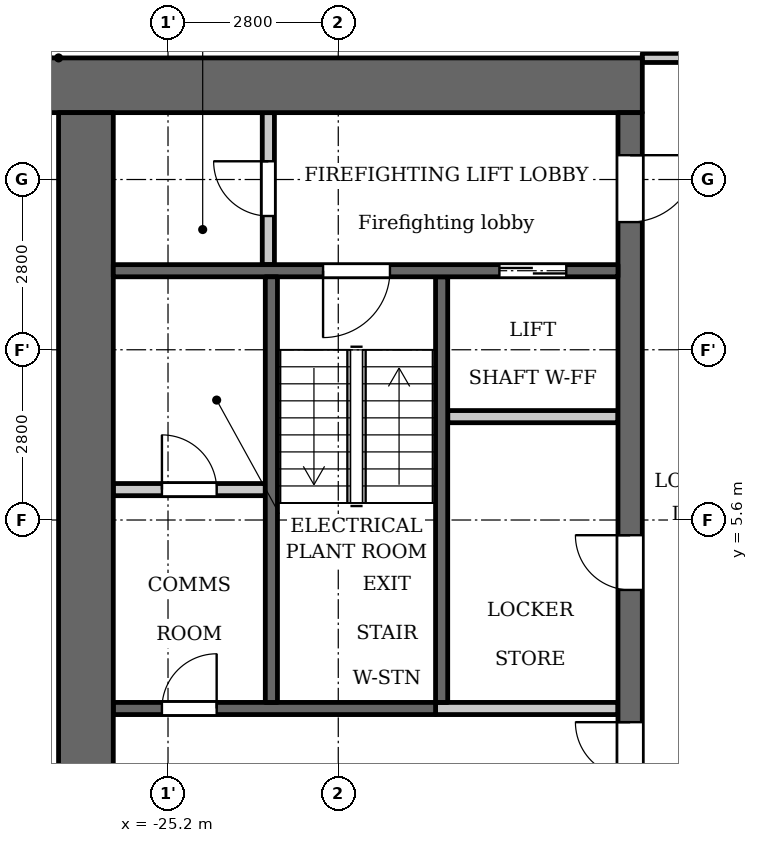
"""IFC4 building model, lengths in metres.
Left out: names, types, materials, properties, quantities, classifications, styles, units other than length and angle.
Written with IfcOpenShell. Run it as: python <this file> out.ifc"""

import sys

from ifc_helpers import new_model, si_unit, direction, frame, frame_2d, origin, place, context, subcontext, project, spatial, rectangle, extrude, element, fill, save


model = new_model("IFC4")
c1 = context("Model", 3, precision=1e-05, world=origin(), true_north=direction((0.0, 1.0)))
c2 = subcontext(c1, "Body", "Model", "MODEL_VIEW")
j1 = project(units=[si_unit("LENGTHUNIT", "METRE"), si_unit("PLANEANGLEUNIT", "RADIAN")], contexts=[c1])
p1 = place(None, origin())
s1 = spatial("IfcSite", under=j1, at=p1, CompositionType="ELEMENT")
p2 = place(p1, origin())
s2 = spatial("IfcBuilding", under=s1, at=p2, CompositionType="ELEMENT")
p3 = place(p2, frame((0.0, 0.0, 51.5)))
s3 = spatial("IfcBuildingStorey", under=s2, at=p3, CompositionType="ELEMENT", Elevation=51.5)
p4 = place(p3, frame((-20.7, 2.6, 0.0), z_axis=(0.0, 0.0, 1.0), x_axis=(0.0, 1.0, 0.0)))
e1 = element("IfcWall", 1, at=p4, inside=s3, PredefinedType="SHEAR", context=c2, shape_type="SweptSolid", body=[
    extrude(rectangle(XDim=7.0, YDim=0.2, at=frame_2d((3.5, 0.0))), origin(), (0.0, 0.0, 1.0), 3.2),
])
p5 = place(p3, frame((-20.8, 2.5, 0.0), z_axis=(0.0, 0.0, 1.0), x_axis=(-1.0, 0.0, 0.0)))
e2 = element("IfcWall", 2, at=p5, inside=s3, PredefinedType="SHEAR", context=c2, shape_type="SweptSolid", body=[
    extrude(rectangle(XDim=5.3, YDim=0.2, at=frame_2d((2.65, 0.0))), origin(), (0.0, 0.0, 1.0), 3.2),
])
p6 = place(p5, frame((3.6, 0.0, 0.0)))
e3 = element("IfcOpeningElement", 3, at=p6, cuts=e2, PredefinedType="OPENING", context=c2, shape_type="SweptSolid", body=[
    extrude(rectangle(XDim=0.9, YDim=2.1, at=frame_2d((0.45, 1.05))), frame((0.0, 0.11, 0.0), z_axis=(0.0, -1.0, 0.0), x_axis=(1.0, 0.0, 0.0)), (0.0, 0.0, 1.0), 0.22),
])
p7 = place(p3, frame((-17.4, 12.75, 0.0), z_axis=(0.0, 0.0, 1.0), x_axis=(-1.0, 0.0, 0.0)))
e4 = element("IfcWall", 4, at=p7, inside=s3, PredefinedType="SHEAR", context=c2, shape_type="SweptSolid", body=[
    extrude(rectangle(XDim=10.4, YDim=0.9, at=frame_2d((5.2, 0.0))), origin(), (0.0, 0.0, 1.0), 3.2),
])
p8 = place(p3, frame((-17.6, -12.3, 0.0), z_axis=(0.0, 0.0, 1.0), x_axis=(0.0, 1.0, 0.0)))
e5 = element("IfcWall", 5, at=p8, inside=s3, PredefinedType="SHEAR", context=c2, shape_type="SweptSolid", body=[
    extrude(rectangle(XDim=24.6, YDim=0.4, at=frame_2d((12.3, 0.0))), origin(), (0.0, 0.0, 1.0), 3.2),
])
p9 = place(p8, frame((6.0, 0.0, 0.0)))
e6 = element("IfcOpeningElement", 6, at=p9, cuts=e5, PredefinedType="OPENING", context=c2, shape_type="SweptSolid", body=[
    extrude(rectangle(XDim=1.1, YDim=2.1, at=frame_2d((0.55, 1.05))), frame((0.0, 0.21, 0.0), z_axis=(0.0, -1.0, 0.0), x_axis=(1.0, 0.0, 0.0)), (0.0, 0.0, 1.0), 0.42),
])
p10 = place(p8, frame((8.4, 0.0, 0.0)))
e7 = element("IfcOpeningElement", 7, at=p10, cuts=e5, PredefinedType="OPENING", context=c2, shape_type="SweptSolid", body=[
    extrude(rectangle(XDim=1.1, YDim=2.1, at=frame_2d((0.55, 1.05))), frame((0.0, 0.21, 0.0), z_axis=(0.0, -1.0, 0.0), x_axis=(1.0, 0.0, 0.0)), (0.0, 0.0, 1.0), 0.42),
])
p11 = place(p8, frame((10.8, 0.0, 0.0)))
e8 = element("IfcOpeningElement", 8, at=p11, cuts=e5, PredefinedType="OPENING", context=c2, shape_type="SweptSolid", body=[
    extrude(rectangle(XDim=1.1, YDim=2.1, at=frame_2d((0.55, 1.05))), frame((0.0, 0.21, 0.0), z_axis=(0.0, -1.0, 0.0), x_axis=(1.0, 0.0, 0.0)), (0.0, 0.0, 1.0), 0.42),
])
p12 = place(p8, frame((16.75, 0.0, 0.0)))
e9 = element("IfcOpeningElement", 9, at=p12, cuts=e5, PredefinedType="OPENING", context=c2, shape_type="SweptSolid", body=[
    extrude(rectangle(XDim=0.9, YDim=2.1, at=frame_2d((0.45, 1.05))), frame((0.0, 0.21, 0.0), z_axis=(0.0, -1.0, 0.0), x_axis=(1.0, 0.0, 0.0)), (0.0, 0.0, 1.0), 0.42),
])
p13 = place(p8, frame((22.8, 0.0, 0.0)))
e10 = element("IfcOpeningElement", 10, at=p13, cuts=e5, PredefinedType="OPENING", context=c2, shape_type="SweptSolid", body=[
    extrude(rectangle(XDim=1.1, YDim=2.1, at=frame_2d((0.55, 1.05))), frame((0.0, 0.21, 0.0), z_axis=(0.0, -1.0, 0.0), x_axis=(1.0, 0.0, 0.0)), (0.0, 0.0, 1.0), 0.42),
])
p14 = place(p8, frame((0.7, 0.0, 0.0)))
e11 = element("IfcOpeningElement", 11, at=p14, cuts=e5, PredefinedType="OPENING", context=c2, shape_type="SweptSolid", body=[
    extrude(rectangle(XDim=1.1, YDim=2.1, at=frame_2d((0.55, 1.05))), frame((0.0, 0.21, 0.0), z_axis=(0.0, -1.0, 0.0), x_axis=(1.0, 0.0, 0.0)), (0.0, 0.0, 1.0), 0.42),
])
p15 = place(p8, frame((12.775, 0.0, 0.0)))
e12 = element("IfcOpeningElement", 12, at=p15, cuts=e5, PredefinedType="OPENING", context=c2, shape_type="SweptSolid", body=[
    extrude(rectangle(XDim=1.8, YDim=2.1, at=frame_2d((0.9, 1.05))), frame((0.0, 0.21, 0.0), z_axis=(0.0, -1.0, 0.0), x_axis=(1.0, 0.0, 0.0)), (0.0, 0.0, 1.0), 0.42),
])
p16 = place(p3, frame((-26.55, -12.3, 0.0), z_axis=(0.0, 0.0, 1.0), x_axis=(0.0, 1.0, 0.0)))
e13 = element("IfcWall", 13, at=p16, inside=s3, PredefinedType="SHEAR", context=c2, shape_type="SweptSolid", body=[
    extrude(rectangle(XDim=24.6, YDim=0.9, at=frame_2d((12.3, 0.0))), origin(), (0.0, 0.0, 1.0), 3.2),
])
p17 = place(p3, frame((-23.55, 9.8, 0.0), z_axis=(0.0, 0.0, 1.0), x_axis=(0.0, 1.0, 0.0)))
e14 = element("IfcWall", 14, at=p17, inside=s3, PredefinedType="PARTITIONING", context=c2, shape_type="SweptSolid", body=[
    extrude(rectangle(XDim=2.5, YDim=0.2, at=frame_2d((1.25, 0.0))), origin(), (0.0, 0.0, 1.0), 3.2),
])
p18 = place(p17, frame((0.8, 0.0, 0.0)))
e15 = element("IfcOpeningElement", 15, at=p18, cuts=e14, PredefinedType="OPENING", context=c2, shape_type="SweptSolid", body=[
    extrude(rectangle(XDim=0.9, YDim=2.1, at=frame_2d((0.45, 1.05))), frame((0.0, 0.11, 0.0), z_axis=(0.0, -1.0, 0.0), x_axis=(1.0, 0.0, 0.0)), (0.0, 0.0, 1.0), 0.22),
])
p19 = place(p3, frame((-23.6, 6.1, 0.0), z_axis=(0.0, 0.0, 1.0), x_axis=(-1.0, 0.0, 0.0)))
e16 = element("IfcWall", 16, at=p19, inside=s3, PredefinedType="PARTITIONING", context=c2, shape_type="SweptSolid", body=[
    extrude(rectangle(XDim=2.5, YDim=0.2, at=frame_2d((1.25, 0.0))), origin(), (0.0, 0.0, 1.0), 3.2),
])
p20 = place(p19, frame((0.8, 0.0, 0.0)))
e17 = element("IfcOpeningElement", 17, at=p20, cuts=e16, PredefinedType="OPENING", context=c2, shape_type="SweptSolid", body=[
    extrude(rectangle(XDim=0.9, YDim=2.1, at=frame_2d((0.45, 1.05))), frame((0.0, 0.11, 0.0), z_axis=(0.0, -1.0, 0.0), x_axis=(1.0, 0.0, 0.0)), (0.0, 0.0, 1.0), 0.22),
])
p21 = place(p3, frame((-17.8, 2.5, 0.0), z_axis=(0.0, 0.0, 1.0), x_axis=(-1.0, 0.0, 0.0)))
e18 = element("IfcWall", 18, at=p21, inside=s3, PredefinedType="PARTITIONING", context=c2, shape_type="SweptSolid", body=[
    extrude(rectangle(XDim=3.0, YDim=0.2, at=frame_2d((1.5, 0.0))), origin(), (0.0, 0.0, 1.0), 3.2),
])
p22 = place(p3, frame((-17.8, 7.3, 0.0), z_axis=(0.0, 0.0, 1.0), x_axis=(-1.0, 0.0, 0.0)))
e19 = element("IfcWall", 19, at=p22, inside=s3, PredefinedType="PARTITIONING", context=c2, shape_type="SweptSolid", body=[
    extrude(rectangle(XDim=2.8, YDim=0.2, at=frame_2d((1.4, 0.0))), origin(), (0.0, 0.0, 1.0), 3.2),
])
p23 = place(p3, frame((-17.8, 9.7, 0.0), z_axis=(0.0, 0.0, 1.0), x_axis=(-1.0, 0.0, 0.0)))
e20 = element("IfcWall", 20, at=p23, inside=s3, PredefinedType="SHEAR", context=c2, shape_type="SweptSolid", body=[
    extrude(rectangle(XDim=8.3, YDim=0.2, at=frame_2d((4.15, 0.0))), origin(), (0.0, 0.0, 1.0), 3.2),
])
p24 = place(p23, frame((0.85, 0.0, 0.0)))
e21 = element("IfcOpeningElement", 21, at=p24, cuts=e20, PredefinedType="OPENING", context=c2, shape_type="SweptSolid", body=[
    extrude(rectangle(XDim=1.1, YDim=2.1, at=frame_2d((0.55, 1.05))), frame((0.0, 0.11, 0.0), z_axis=(0.0, -1.0, 0.0), x_axis=(1.0, 0.0, 0.0)), (0.0, 0.0, 1.0), 0.22),
])
p25 = place(p23, frame((3.75, 0.0, 0.0)))
e22 = element("IfcOpeningElement", 22, at=p25, cuts=e20, PredefinedType="OPENING", context=c2, shape_type="SweptSolid", body=[
    extrude(rectangle(XDim=1.1, YDim=2.1, at=frame_2d((0.55, 1.05))), frame((0.0, 0.11, 0.0), z_axis=(0.0, -1.0, 0.0), x_axis=(1.0, 0.0, 0.0)), (0.0, 0.0, 1.0), 0.22),
])
p26 = place(p3, frame((-23.5, 2.6, 0.0), z_axis=(0.0, 0.0, 1.0), x_axis=(0.0, 1.0, 0.0)))
e23 = element("IfcWall", 23, at=p26, inside=s3, PredefinedType="SHEAR", context=c2, shape_type="SweptSolid", body=[
    extrude(rectangle(XDim=7.0, YDim=0.2, at=frame_2d((3.5, 0.0))), origin(), (0.0, 0.0, 1.0), 3.2),
])
p27 = place(p3, frame((-17.4, 13.2, 0.0), z_axis=(0.0, 0.0, 1.0), x_axis=(1.0, 0.0, 0.0)))
e24 = element("IfcWall", 24, at=p27, inside=s3, PredefinedType="PARTITIONING", context=c2, shape_type="SweptSolid", body=[
    extrude(rectangle(XDim=34.8, YDim=0.15, at=frame_2d((17.4, 0.0))), origin(), (0.0, 0.0, 1.0), 3.2),
])
p28 = place(p27, frame((0.75, 0.0, 0.0)))
e25 = element("IfcOpeningElement", 25, at=p28, cuts=e24, PredefinedType="OPENING", context=c2, shape_type="SweptSolid", body=[
    extrude(rectangle(XDim=1.0, YDim=2.1, at=frame_2d((0.5, 1.05))), frame((0.0, 0.085, 0.0), z_axis=(0.0, -1.0, 0.0), x_axis=(1.0, 0.0, 0.0)), (0.0, 0.0, 1.0), 0.17),
])
p29 = place(p27, frame((33.15, 0.0, 0.0)))
e26 = element("IfcOpeningElement", 26, at=p29, cuts=e24, PredefinedType="OPENING", context=c2, shape_type="SweptSolid", body=[
    extrude(rectangle(XDim=1.0, YDim=2.1, at=frame_2d((0.5, 1.05))), frame((0.0, 0.085, 0.0), z_axis=(0.0, -1.0, 0.0), x_axis=(1.0, 0.0, 0.0)), (0.0, 0.0, 1.0), 0.17),
])
p30 = place(p27, frame((6.85, 0.0, 0.0)))
e27 = element("IfcOpeningElement", 27, at=p30, cuts=e24, PredefinedType="OPENING", context=c2, shape_type="SweptSolid", body=[
    extrude(rectangle(XDim=1.0, YDim=2.1, at=frame_2d((0.5, 1.05))), frame((0.0, 0.085, 0.0), z_axis=(0.0, -1.0, 0.0), x_axis=(1.0, 0.0, 0.0)), (0.0, 0.0, 1.0), 0.17),
])
p31 = place(p27, frame((18.05, 0.0, 0.0)))
e28 = element("IfcOpeningElement", 28, at=p31, cuts=e24, PredefinedType="OPENING", context=c2, shape_type="SweptSolid", body=[
    extrude(rectangle(XDim=1.0, YDim=2.1, at=frame_2d((0.5, 1.05))), frame((0.0, 0.085, 0.0), z_axis=(0.0, -1.0, 0.0), x_axis=(1.0, 0.0, 0.0)), (0.0, 0.0, 1.0), 0.17),
])
p32 = place(p27, frame((29.25, 0.0, 0.0)))
e29 = element("IfcOpeningElement", 29, at=p32, cuts=e24, PredefinedType="OPENING", context=c2, shape_type="SweptSolid", body=[
    extrude(rectangle(XDim=1.0, YDim=2.1, at=frame_2d((0.5, 1.05))), frame((0.0, 0.085, 0.0), z_axis=(0.0, -1.0, 0.0), x_axis=(1.0, 0.0, 0.0)), (0.0, 0.0, 1.0), 0.17),
])
p33 = place(p12, origin())
e30 = element("IfcDoor", 30, at=p33, inside=s3, OperationType="SINGLE_SWING_LEFT", PredefinedType="DOOR", context=c2, shape_type="SweptSolid", body=[
    extrude(rectangle(XDim=0.9, YDim=2.1, at=frame_2d((0.45, 1.05))), frame((0.0, 0.025, 0.0), z_axis=(0.0, -1.0, 0.0), x_axis=(1.0, 0.0, 0.0)), (0.0, 0.0, 1.0), 0.05),
])
fill(e9, e30)
p34 = place(p24, origin())
e31 = element("IfcDoor", 31, at=p34, inside=s3, OperationType="DOUBLE_DOOR_SLIDING", PredefinedType="DOOR", context=c2, shape_type="SweptSolid", body=[
    extrude(rectangle(XDim=1.1, YDim=2.1, at=frame_2d((0.55, 1.05))), frame((0.0, 0.025, 0.0), z_axis=(0.0, -1.0, 0.0), x_axis=(1.0, 0.0, 0.0)), (0.0, 0.0, 1.0), 0.05),
])
fill(e21, e31)
p35 = place(p13, origin())
e32 = element("IfcDoor", 32, at=p35, inside=s3, OperationType="SINGLE_SWING_RIGHT", PredefinedType="DOOR", context=c2, shape_type="SweptSolid", body=[
    extrude(rectangle(XDim=1.1, YDim=2.1, at=frame_2d((0.55, 1.05))), frame((0.0, 0.025, 0.0), z_axis=(0.0, -1.0, 0.0), x_axis=(1.0, 0.0, 0.0)), (0.0, 0.0, 1.0), 0.05),
])
fill(e10, e32)
p36 = place(p18, origin())
e33 = element("IfcDoor", 33, at=p36, inside=s3, OperationType="SINGLE_SWING_LEFT", PredefinedType="DOOR", context=c2, shape_type="SweptSolid", body=[
    extrude(rectangle(XDim=0.9, YDim=2.1, at=frame_2d((0.45, 1.05))), frame((0.0, 0.025, 0.0), z_axis=(0.0, -1.0, 0.0), x_axis=(1.0, 0.0, 0.0)), (0.0, 0.0, 1.0), 0.05),
])
fill(e15, e33)
p37 = place(p25, origin())
e34 = element("IfcDoor", 34, at=p37, inside=s3, OperationType="SINGLE_SWING_LEFT", PredefinedType="DOOR", context=c2, shape_type="SweptSolid", body=[
    extrude(rectangle(XDim=1.1, YDim=2.1, at=frame_2d((0.55, 1.05))), frame((0.0, 0.025, 0.0), z_axis=(0.0, -1.0, 0.0), x_axis=(1.0, 0.0, 0.0)), (0.0, 0.0, 1.0), 0.05),
])
fill(e22, e34)
p38 = place(p15, origin())
e35 = element("IfcDoor", 35, at=p38, inside=s3, OperationType="DOUBLE_DOOR_SINGLE_SWING", PredefinedType="DOOR", context=c2, shape_type="SweptSolid", body=[
    extrude(rectangle(XDim=1.8, YDim=2.1, at=frame_2d((0.9, 1.05))), frame((0.0, 0.025, 0.0), z_axis=(0.0, -1.0, 0.0), x_axis=(1.0, 0.0, 0.0)), (0.0, 0.0, 1.0), 0.05),
])
fill(e12, e35)
p39 = place(p20, origin())
e36 = element("IfcDoor", 36, at=p39, inside=s3, OperationType="SINGLE_SWING_RIGHT", PredefinedType="DOOR", context=c2, shape_type="SweptSolid", body=[
    extrude(rectangle(XDim=0.9, YDim=2.1, at=frame_2d((0.45, 1.05))), frame((0.0, 0.025, 0.0), z_axis=(0.0, -1.0, 0.0), x_axis=(1.0, 0.0, 0.0)), (0.0, 0.0, 1.0), 0.05),
])
fill(e17, e36)
p40 = place(p6, origin())
e37 = element("IfcDoor", 37, at=p40, inside=s3, OperationType="SINGLE_SWING_LEFT", PredefinedType="DOOR", context=c2, shape_type="SweptSolid", body=[
    extrude(rectangle(XDim=0.9, YDim=2.1, at=frame_2d((0.45, 1.05))), frame((0.0, 0.025, 0.0), z_axis=(0.0, -1.0, 0.0), x_axis=(1.0, 0.0, 0.0)), (0.0, 0.0, 1.0), 0.05),
])
fill(e3, e37)
save(model, sys.argv[1])
